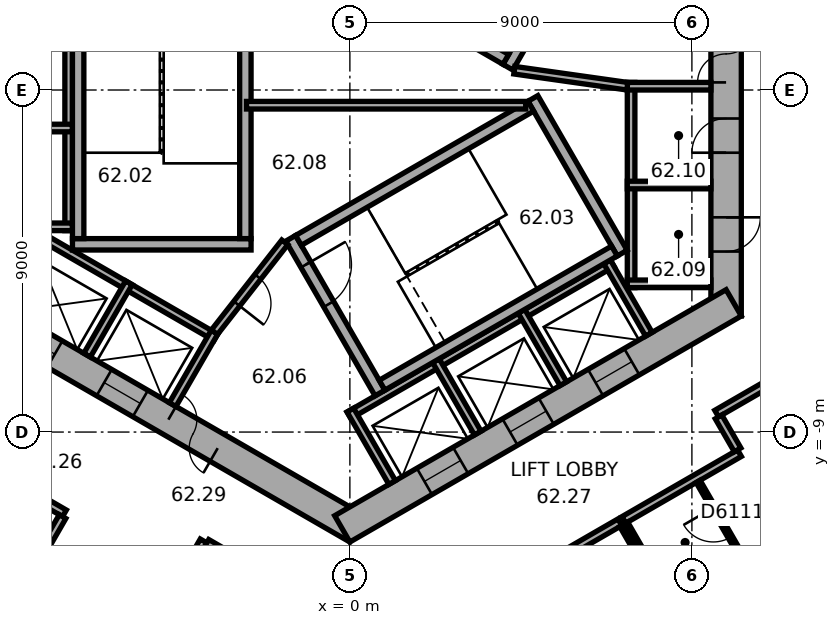
"""IFC4 building model, lengths in metres.
Left out: names, types, materials, properties, quantities, classifications, styles, units other than length and angle.
Written with IfcOpenShell. Run it as: python <this file> out.ifc"""

import sys

from ifc_helpers import new_model, si_unit, direction, frame, frame_2d, origin, place, context, subcontext, project, spatial, rectangle, extrude, element, fill, save


model = new_model("IFC4")
c1 = context("Model", 3, precision=1e-05, world=origin(), true_north=direction((0.0, 1.0)))
c2 = subcontext(c1, "Body", "Model", "MODEL_VIEW")
j1 = project(units=[si_unit("LENGTHUNIT", "METRE"), si_unit("PLANEANGLEUNIT", "RADIAN")], contexts=[c1])
p1 = place(None, origin())
s1 = spatial("IfcSite", under=j1, at=p1, CompositionType="ELEMENT")
p2 = place(p1, origin())
s2 = spatial("IfcBuilding", under=s1, at=p2, CompositionType="ELEMENT")
p3 = place(p2, frame((0.0, 0.0, 251.3)))
s3 = spatial("IfcBuildingStorey", under=s2, at=p3, CompositionType="ELEMENT", Elevation=251.3)
p4 = place(p3, frame((9.9, -5.947, 0.0), z_axis=(0.0, 0.0, 1.0), x_axis=(0.0, 1.0, 0.0)))
e1 = element("IfcWall", 1, at=p4, inside=s3, PredefinedType="SHEAR", context=c2, shape_type="SweptSolid", body=[
    extrude(rectangle(XDim=11.894, YDim=0.8, at=frame_2d((5.947, 0.0))), origin(), (0.0, 0.0, 1.0), 3.7),
])
p5 = place(p4, frame((6.147, 0.0, 0.0)))
e2 = element("IfcOpeningElement", 2, at=p5, cuts=e1, PredefinedType="OPENING", context=c2, shape_type="SweptSolid", body=[
    extrude(rectangle(XDim=1.5, YDim=2.1, at=frame_2d((0.75, 1.05))), frame((0.0, 0.41, 0.0), z_axis=(0.0, -1.0, 0.0), x_axis=(1.0, 0.0, 0.0)), (0.0, 0.0, 1.0), 0.82),
])
p6 = place(p4, frame((1.697, 0.0, 0.0)))
e3 = element("IfcOpeningElement", 3, at=p6, cuts=e1, PredefinedType="OPENING", context=c2, shape_type="SweptSolid", body=[
    extrude(rectangle(XDim=0.9, YDim=2.1, at=frame_2d((0.45, 1.05))), frame((0.0, 0.41, 0.0), z_axis=(0.0, -1.0, 0.0), x_axis=(1.0, 0.0, 0.0)), (0.0, 0.0, 1.0), 0.82),
])
p7 = place(p4, frame((4.297, 0.0, 0.0)))
e4 = element("IfcOpeningElement", 4, at=p7, cuts=e1, PredefinedType="OPENING", context=c2, shape_type="SweptSolid", body=[
    extrude(rectangle(XDim=0.9, YDim=2.1, at=frame_2d((0.45, 1.05))), frame((0.0, 0.41, 0.0), z_axis=(0.0, -1.0, 0.0), x_axis=(1.0, 0.0, 0.0)), (0.0, 0.0, 1.0), 0.82),
])
p8 = place(p3, frame((-10.1, -5.6, 0.0), z_axis=(0.0, 0.0, 1.0), x_axis=(0.866023897231, -0.500002609418, 0.0)))
e5 = element("IfcWall", 5, at=p8, inside=s3, PredefinedType="SHEAR", context=c2, shape_type="SweptSolid", body=[
    extrude(rectangle(XDim=11.894, YDim=0.8, at=frame_2d((5.947, 0.0))), origin(), (0.0, 0.0, 1.0), 3.7),
])
p9 = place(p8, frame((6.147, 0.0, 0.0)))
e6 = element("IfcOpeningElement", 6, at=p9, cuts=e5, PredefinedType="OPENING", context=c2, shape_type="SweptSolid", body=[
    extrude(rectangle(XDim=1.5, YDim=2.1, at=frame_2d((0.75, 1.05))), frame((0.0, 0.41, 0.0), z_axis=(0.0, -1.0, 0.0), x_axis=(1.0, 0.0, 0.0)), (0.0, 0.0, 1.0), 0.82),
])
p10 = place(p8, frame((1.597, 0.0, 0.0)))
e7 = element("IfcOpeningElement", 7, at=p10, cuts=e5, PredefinedType="OPENING", context=c2, shape_type="SweptSolid", body=[
    extrude(rectangle(XDim=1.1, YDim=2.1, at=frame_2d((0.55, 1.05))), frame((0.0, 0.41, 0.0), z_axis=(0.0, -1.0, 0.0), x_axis=(1.0, 0.0, 0.0)), (0.0, 0.0, 1.0), 0.82),
])
p11 = place(p8, frame((4.197, 0.0, 0.0)))
e8 = element("IfcOpeningElement", 8, at=p11, cuts=e5, PredefinedType="OPENING", context=c2, shape_type="SweptSolid", body=[
    extrude(rectangle(XDim=1.1, YDim=2.1, at=frame_2d((0.55, 1.05))), frame((0.0, 0.41, 0.0), z_axis=(0.0, -1.0, 0.0), x_axis=(1.0, 0.0, 0.0)), (0.0, 0.0, 1.0), 0.82),
])
p12 = place(p3, frame((-0.2, -11.547, 0.0), z_axis=(0.0, 0.0, 1.0), x_axis=(0.866023897231, 0.500002609418, 0.0)))
e9 = element("IfcWall", 9, at=p12, inside=s3, PredefinedType="SHEAR", context=c2, shape_type="SweptSolid", body=[
    extrude(rectangle(XDim=11.894, YDim=0.8, at=frame_2d((5.947, 0.0))), origin(), (0.0, 0.0, 1.0), 3.7),
])
p13 = place(p12, frame((2.497, 0.0, 0.0)))
e10 = element("IfcOpeningElement", 10, at=p13, cuts=e9, PredefinedType="OPENING", context=c2, shape_type="SweptSolid", body=[
    extrude(rectangle(XDim=1.1, YDim=2.1, at=frame_2d((0.55, 1.05))), frame((0.0, 0.41, 0.0), z_axis=(0.0, -1.0, 0.0), x_axis=(1.0, 0.0, 0.0)), (0.0, 0.0, 1.0), 0.82),
])
p14 = place(p12, frame((5.097, 0.0, 0.0)))
e11 = element("IfcOpeningElement", 11, at=p14, cuts=e9, PredefinedType="OPENING", context=c2, shape_type="SweptSolid", body=[
    extrude(rectangle(XDim=1.1, YDim=2.1, at=frame_2d((0.55, 1.05))), frame((0.0, 0.41, 0.0), z_axis=(0.0, -1.0, 0.0), x_axis=(1.0, 0.0, 0.0)), (0.0, 0.0, 1.0), 0.82),
])
p15 = place(p12, frame((7.697, 0.0, 0.0)))
e12 = element("IfcOpeningElement", 12, at=p15, cuts=e9, PredefinedType="OPENING", context=c2, shape_type="SweptSolid", body=[
    extrude(rectangle(XDim=1.1, YDim=2.1, at=frame_2d((0.55, 1.05))), frame((0.0, 0.41, 0.0), z_axis=(0.0, -1.0, 0.0), x_axis=(1.0, 0.0, 0.0)), (0.0, 0.0, 1.0), 0.82),
])
p16 = place(p3, frame((7.4, -5.2, 0.0), z_axis=(0.0, 0.0, 1.0), x_axis=(0.0, 1.0, 0.0)))
e13 = element("IfcWall", 13, at=p16, inside=s3, PredefinedType="PARTITIONING", context=c2, shape_type="SweptSolid", body=[
    extrude(rectangle(XDim=5.4, YDim=0.2, at=frame_2d((2.7, 0.0))), origin(), (0.0, 0.0, 1.0), 3.35),
])
for number, where, z_axis, x_axis in (
    (14, (7.3, -5.1, 0.0), (0.0, 0.0, 1.0), (1.0, 0.0, 0.0)),
    (15, (7.3, -2.5, 0.0), (0.0, 0.0, 1.0), (1.0, 0.0, 0.0)),
    (16, (7.3, 0.1, 0.0), (0.0, 0.0, 1.0), (1.0, 0.0, 0.0)),
):
    element("IfcWall", number, at=place(p3, frame(where, z_axis=z_axis, x_axis=x_axis)), inside=s3, PredefinedType="PARTITIONING", context=c2, shape_type="SweptSolid", body=[
        extrude(rectangle(XDim=2.2, YDim=0.2, at=frame_2d((1.1, 0.0))), origin(), (0.0, 0.0, 1.0), 3.35),
    ])
p17 = place(p3, frame((-7.4, 4.3, 0.0), z_axis=(0.0, 0.0, 1.0), x_axis=(0.0, -1.0, 0.0)))
e17 = element("IfcWall", 17, at=p17, inside=s3, PredefinedType="PARTITIONING", context=c2, shape_type="SweptSolid", body=[
    extrude(rectangle(XDim=8.0, YDim=0.2, at=frame_2d((4.0, 0.0))), origin(), (0.0, 0.0, 1.0), 3.35),
])
for number, where, z_axis, x_axis in (
    (18, (-7.3, -1.0, 0.0), (0.0, 0.0, 1.0), (-1.0, 0.0, 0.0)),
    (19, (-7.3, -3.6, 0.0), (0.0, 0.0, 1.0), (-1.0, 0.0, 0.0)),
):
    element("IfcWall", number, at=place(p3, frame(where, z_axis=z_axis, x_axis=x_axis)), inside=s3, PredefinedType="PARTITIONING", context=c2, shape_type="SweptSolid", body=[
        extrude(rectangle(XDim=2.2, YDim=0.2, at=frame_2d((1.1, 0.0))), origin(), (0.0, 0.0, 1.0), 3.35),
    ])
p18 = place(p3, frame((-8.203, -3.809, 0.0), z_axis=(0.0, 0.0, 1.0), x_axis=(0.866028230842, -0.499995103361, 0.0)))
e20 = element("IfcWall", 20, at=p18, inside=s3, PredefinedType="PARTITIONING", context=c2, shape_type="SweptSolid", body=[
    extrude(rectangle(XDim=5.4, YDim=0.2, at=frame_2d((2.7, 0.0))), origin(), (0.0, 0.0, 1.0), 3.35),
])
p19 = place(p3, frame((-5.815, -5.072, 0.0), z_axis=(0.0, 0.0, 1.0), x_axis=(-0.499946605688, -0.86605622881, 0.0)))
e21 = element("IfcWall", 21, at=p19, inside=s3, PredefinedType="PARTITIONING", context=c2, shape_type="SweptSolid", body=[
    extrude(rectangle(XDim=2.2, YDim=0.2, at=frame_2d((1.1, 0.0))), origin(), (0.0, 0.0, 1.0), 3.35),
])
p20 = place(p3, frame((-3.563, -6.372, 0.0), z_axis=(0.0, 0.0, 1.0), x_axis=(-0.499994660107, -0.866028486751, 0.0)))
e22 = element("IfcWall", 22, at=p20, inside=s3, PredefinedType="PARTITIONING", context=c2, shape_type="SweptSolid", body=[
    extrude(rectangle(XDim=2.2, YDim=0.2, at=frame_2d((1.1, 0.0))), origin(), (0.0, 0.0, 1.0), 3.35),
])
p21 = place(p3, frame((-0.024, -8.559, 0.0), z_axis=(0.0, 0.0, 1.0), x_axis=(0.866026010844, 0.49999894854, 0.0)))
e23 = element("IfcWall", 23, at=p21, inside=s3, PredefinedType="PARTITIONING", context=c2, shape_type="SweptSolid", body=[
    extrude(rectangle(XDim=8.0, YDim=0.2, at=frame_2d((4.0, 0.0))), origin(), (0.0, 0.0, 1.0), 3.35),
])
for number, where, z_axis, x_axis in (
    (24, (0.013, -8.422, 0.0), (0.0, 0.0, 1.0), (0.5, -0.866, 0.0)),
    (25, (2.264, -7.122, 0.0), (0.0, 0.0, 1.0), (0.5, -0.866, 0.0)),
    (26, (4.516, -5.822, 0.0), (0.0, 0.0, 1.0), (0.5, -0.866, 0.0)),
    (27, (6.768, -4.522, 0.0), (0.0, 0.0, 1.0), (0.5, -0.866, 0.0)),
):
    element("IfcWall", number, at=place(p3, frame(where, z_axis=z_axis, x_axis=x_axis)), inside=s3, PredefinedType="PARTITIONING", context=c2, shape_type="SweptSolid", body=[
        extrude(rectangle(XDim=2.2, YDim=0.2, at=frame_2d((1.1, 0.0))), origin(), (0.0, 0.0, 1.0), 3.35),
    ])
p22 = place(p3, frame((4.158, 0.602, 0.0), z_axis=(0.0, 0.0, 1.0), x_axis=(0.499977259774, 0.866038532462, 0.0)))
e28 = element("IfcWall", 28, at=p22, inside=s3, PredefinedType="SHEAR", context=c2, shape_type="SweptSolid", body=[
    extrude(rectangle(XDim=4.7, YDim=0.3, at=frame_2d((2.35, 0.0))), origin(), (0.0, 0.0, 1.0), 3.35),
])
p23 = place(p22, frame((0.8, 0.0, 0.0)))
e29 = element("IfcOpeningElement", 29, at=p23, cuts=e28, PredefinedType="OPENING", context=c2, shape_type="SweptSolid", body=[
    extrude(rectangle(XDim=1.2, YDim=2.1, at=frame_2d((0.6, 1.05))), frame((0.0, 0.16, 0.0), z_axis=(0.0, -1.0, 0.0), x_axis=(1.0, 0.0, 0.0)), (0.0, 0.0, 1.0), 0.32),
])
p24 = place(p3, frame((4.103, 0.807, 0.0), z_axis=(0.0, 0.0, 1.0), x_axis=(-0.866027801685, 0.499995846692, 0.0)))
e30 = element("IfcWall", 30, at=p24, inside=s3, PredefinedType="SHEAR", context=c2, shape_type="SweptSolid", body=[
    extrude(rectangle(XDim=7.06, YDim=0.3, at=frame_2d((3.53, 0.0))), origin(), (0.0, 0.0, 1.0), 3.35),
])
p25 = place(p3, frame((-2.6, -4.06, 0.0), z_axis=(0.0, 0.0, 1.0), x_axis=(-1.0, 0.0, 0.0)))
e31 = element("IfcWall", 31, at=p25, inside=s3, PredefinedType="SHEAR", context=c2, shape_type="SweptSolid", body=[
    extrude(rectangle(XDim=4.7, YDim=0.3, at=frame_2d((2.35, 0.0))), origin(), (0.0, 0.0, 1.0), 3.35),
])
for number, where, z_axis, x_axis in (
    (32, (-2.75, 3.15, 0.0), (0.0, 0.0, 1.0), (0.0, -1.0, 0.0)),
    (33, (-7.15, 3.15, 0.0), (0.0, 0.0, 1.0), (0.0, -1.0, 0.0)),
):
    element("IfcWall", number, at=place(p3, frame(where, z_axis=z_axis, x_axis=x_axis)), inside=s3, PredefinedType="SHEAR", context=c2, shape_type="SweptSolid", body=[
        extrude(rectangle(XDim=7.06, YDim=0.3, at=frame_2d((3.53, 0.0))), origin(), (0.0, 0.0, 1.0), 3.35),
    ])
p26 = place(p3, frame((-1.558, -3.902, 0.0), z_axis=(0.0, 0.0, 1.0), x_axis=(0.499977259774, -0.866038532462, 0.0)))
e34 = element("IfcWall", 34, at=p26, inside=s3, PredefinedType="SHEAR", context=c2, shape_type="SweptSolid", body=[
    extrude(rectangle(XDim=4.7, YDim=0.3, at=frame_2d((2.35, 0.0))), origin(), (0.0, 0.0, 1.0), 3.35),
])
p27 = place(p26, frame((0.8, 0.0, 0.0)))
e35 = element("IfcOpeningElement", 35, at=p27, cuts=e34, PredefinedType="OPENING", context=c2, shape_type="SweptSolid", body=[
    extrude(rectangle(XDim=1.2, YDim=2.1, at=frame_2d((0.6, 1.05))), frame((0.0, 0.16, 0.0), z_axis=(0.0, -1.0, 0.0), x_axis=(1.0, 0.0, 0.0)), (0.0, 0.0, 1.0), 0.32),
])
p28 = place(p3, frame((4.816, -0.222, 0.0), z_axis=(0.0, 0.0, 1.0), x_axis=(0.499977259774, -0.866038532462, 0.0)))
e36 = element("IfcWall", 36, at=p28, inside=s3, PredefinedType="SHEAR", context=c2, shape_type="SweptSolid", body=[
    extrude(rectangle(XDim=4.7, YDim=0.3, at=frame_2d((2.35, 0.0))), origin(), (0.0, 0.0, 1.0), 3.35),
])
for number, where, z_axis, x_axis in (
    (37, (-1.353, -3.957, 0.0), (0.0, 0.0, 1.0), (0.866, 0.5, 0.0)),
    (38, (0.847, -7.767, 0.0), (0.0, 0.0, 1.0), (0.866, 0.5, 0.0)),
):
    element("IfcWall", number, at=place(p3, frame(where, z_axis=z_axis, x_axis=x_axis)), inside=s3, PredefinedType="SHEAR", context=c2, shape_type="SweptSolid", body=[
        extrude(rectangle(XDim=7.06, YDim=0.3, at=frame_2d((3.53, 0.0))), origin(), (0.0, 0.0, 1.0), 3.35),
    ])
p29 = place(p3, frame((4.327, 0.521, 0.0), z_axis=(0.0, 0.0, 1.0), x_axis=(0.990124376366, -0.14019172346, 0.0)))
e39 = element("IfcWall", 39, at=p29, inside=s3, PredefinedType="PARTITIONING", context=c2, shape_type="SweptSolid", body=[
    extrude(rectangle(XDim=3.002, YDim=0.2, at=frame_2d((1.501, 0.0))), origin(), (0.0, 0.0, 1.0), 3.35),
])
p30 = place(p3, frame((-1.712, -4.008, 0.0), z_axis=(0.0, 0.0, 1.0), x_axis=(-0.616549420702, -0.787316208287, 0.0)))
e40 = element("IfcWall", 40, at=p30, inside=s3, PredefinedType="PARTITIONING", context=c2, shape_type="SweptSolid", body=[
    extrude(rectangle(XDim=3.002, YDim=0.2, at=frame_2d((1.501, 0.0))), origin(), (0.0, 0.0, 1.0), 3.35),
])
p31 = place(p30, frame((1.15, 0.0, 0.0)))
e41 = element("IfcOpeningElement", 41, at=p31, cuts=e40, PredefinedType="OPENING", context=c2, shape_type="SweptSolid", body=[
    extrude(rectangle(XDim=0.9, YDim=2.1, at=frame_2d((0.45, 1.05))), frame((0.0, 0.11, 0.0), z_axis=(0.0, -1.0, 0.0), x_axis=(1.0, 0.0, 0.0)), (0.0, 0.0, 1.0), 0.22),
])
p32 = place(p3, frame((-2.72, -0.4, 0.0), z_axis=(0.0, 0.0, 1.0), x_axis=(1.0, 0.0, 0.0)))
e42 = element("IfcWall", 42, at=p32, inside=s3, PredefinedType="PARTITIONING", context=c2, shape_type="SweptSolid", body=[
    extrude(rectangle(XDim=7.347, YDim=0.2, at=frame_2d((3.674, 0.0))), origin(), (0.0, 0.0, 1.0), 3.35),
])
p33 = place(p3, frame((-11.551, -8.805, 0.0), z_axis=(0.0, 0.0, 1.0), x_axis=(0.866038310922, -0.499977643516, 0.0)))
e43 = element("IfcWall", 43, at=p33, inside=s3, PredefinedType="PARTITIONING", context=c2, shape_type="SweptSolid", body=[
    extrude(rectangle(XDim=4.665, YDim=0.2, at=frame_2d((2.333, 0.0))), origin(), (0.0, 0.0, 1.0), 3.35),
])
p34 = place(p3, frame((-10.585, -16.463, 0.0), z_axis=(0.0, 0.0, 1.0), x_axis=(0.499993802756, 0.866028981735, 0.0)))
e44 = element("IfcWall", 44, at=p34, inside=s3, PredefinedType="PARTITIONING", context=c2, shape_type="SweptSolid", body=[
    extrude(rectangle(XDim=6.049, YDim=0.2, at=frame_2d((3.024, 0.0))), origin(), (0.0, 0.0, 1.0), 2.65),
])
p35 = place(p34, frame((2.524, 0.0, 0.0)))
e45 = element("IfcOpeningElement", 45, at=p35, cuts=e44, PredefinedType="OPENING", context=c2, shape_type="SweptSolid", body=[
    extrude(rectangle(XDim=1.0, YDim=2.1, at=frame_2d((0.5, 1.05))), frame((0.0, 0.11, 0.0), z_axis=(0.0, -1.0, 0.0), x_axis=(1.0, 0.0, 0.0)), (0.0, 0.0, 1.0), 0.22),
])
p36 = place(p3, frame((-7.525, -18.23, 0.0), z_axis=(0.0, 0.0, 1.0), x_axis=(0.499983153418, 0.866035129944, 0.0)))
e46 = element("IfcWall", 46, at=p36, inside=s3, PredefinedType="PARTITIONING", context=c2, shape_type="SweptSolid", body=[
    extrude(rectangle(XDim=7.35, YDim=0.2, at=frame_2d((3.675, 0.0))), origin(), (0.0, 0.0, 1.0), 3.35),
])
p37 = place(p36, frame((3.175, 0.0, 0.0)))
e47 = element("IfcOpeningElement", 47, at=p37, cuts=e46, PredefinedType="OPENING", context=c2, shape_type="SweptSolid", body=[
    extrude(rectangle(XDim=1.0, YDim=2.1, at=frame_2d((0.5, 1.05))), frame((0.0, 0.11, 0.0), z_axis=(0.0, -1.0, 0.0), x_axis=(1.0, 0.0, 0.0)), (0.0, 0.0, 1.0), 0.22),
])
p38 = place(p3, frame((-3.763, -11.915, 0.0), z_axis=(0.0, 0.0, 1.0), x_axis=(0.866037915695, -0.499978328108, 0.0)))
e48 = element("IfcWall", 48, at=p38, inside=s3, PredefinedType="PARTITIONING", context=c2, shape_type="SweptSolid", body=[
    extrude(rectangle(XDim=3.249, YDim=0.2, at=frame_2d((1.625, 0.0))), origin(), (0.0, 0.0, 1.0), 3.35),
])
p39 = place(p3, frame((5.373, -12.372, 0.0), z_axis=(0.0, 0.0, 1.0), x_axis=(0.866010750942, 0.50002537861, 0.0)))
e49 = element("IfcWall", 49, at=p39, inside=s3, PredefinedType="PARTITIONING", context=c2, shape_type="SweptSolid", body=[
    extrude(rectangle(XDim=2.0, YDim=0.2, at=frame_2d((1.0, 0.0))), origin(), (0.0, 0.0, 1.0), 3.35),
])
p40 = place(p3, frame((7.155, -11.459, 0.0), z_axis=(0.0, 0.0, 1.0), x_axis=(0.500077740698, -0.865980515519, 0.0)))
e50 = element("IfcWall", 50, at=p40, inside=s3, PredefinedType="PARTITIONING", context=c2, shape_type="SweptSolid", body=[
    extrude(rectangle(XDim=2.3, YDim=0.12, at=frame_2d((1.15, 0.0))), origin(), (0.0, 0.0, 1.0), 3.35),
])
p41 = place(p3, frame((7.208, -11.312, 0.0), z_axis=(0.0, 0.0, 1.0), x_axis=(0.866050243185, 0.499956974429, 0.0)))
e51 = element("IfcWall", 51, at=p41, inside=s3, PredefinedType="PARTITIONING", context=c2, shape_type="SweptSolid", body=[
    extrude(rectangle(XDim=3.514, YDim=0.2, at=frame_2d((1.757, 0.0))), origin(), (0.0, 0.0, 1.0), 3.35),
])
p42 = place(p3, frame((8.509, -13.564, 0.0), z_axis=(0.0, 0.0, 1.0), x_axis=(-0.500004234368, 0.866022959057, 0.0)))
e52 = element("IfcWall", 52, at=p42, inside=s3, PredefinedType="PARTITIONING", context=c2, shape_type="SweptSolid", body=[
    extrude(rectangle(XDim=2.5, YDim=0.12, at=frame_2d((1.25, 0.0))), origin(), (0.0, 0.0, 1.0), 3.35),
])
p43 = place(p3, frame((9.164, -10.299, 0.0), z_axis=(0.0, 0.0, 1.0), x_axis=(0.500004234368, -0.866022959057, 0.0)))
e53 = element("IfcWall", 53, at=p43, inside=s3, PredefinedType="PARTITIONING", context=c2, shape_type="SweptSolid", body=[
    extrude(rectangle(XDim=2.5, YDim=0.12, at=frame_2d((1.25, 0.0))), origin(), (0.0, 0.0, 1.0), 3.35),
])
p44 = place(p43, frame((0.8, 0.0, 0.0)))
e54 = element("IfcOpeningElement", 54, at=p44, cuts=e53, PredefinedType="OPENING", context=c2, shape_type="SweptSolid", body=[
    extrude(rectangle(XDim=0.9, YDim=2.1, at=frame_2d((0.45, 1.05))), frame((0.0, 0.07, 0.0), z_axis=(0.0, -1.0, 0.0), x_axis=(1.0, 0.0, 0.0)), (0.0, 0.0, 1.0), 0.14),
])
p45 = place(p3, frame((9.652, -8.515, 0.0), z_axis=(0.0, 0.0, 1.0), x_axis=(0.866020375458, 0.500008709215, 0.0)))
e55 = element("IfcWall", 55, at=p45, inside=s3, PredefinedType="PARTITIONING", context=c2, shape_type="SweptSolid", body=[
    extrude(rectangle(XDim=1.846, YDim=0.2, at=frame_2d((0.923, 0.0))), origin(), (0.0, 0.0, 1.0), 3.35),
])
p46 = place(p3, frame((10.202, -9.469, 0.0), z_axis=(0.0, 0.0, 1.0), x_axis=(-0.499968756647, 0.866043441391, 0.0)))
e56 = element("IfcWall", 56, at=p46, inside=s3, PredefinedType="PARTITIONING", context=c2, shape_type="SweptSolid", body=[
    extrude(rectangle(XDim=1.001, YDim=0.2, at=frame_2d((0.5, 0.0))), origin(), (0.0, 0.0, 1.0), 3.35),
])
p47 = place(p5, origin())
e57 = element("IfcDoor", 57, at=p47, inside=s3, OperationType="DOUBLE_DOOR_SINGLE_SWING", PredefinedType="DOOR", context=c2, shape_type="SweptSolid", body=[
    extrude(rectangle(XDim=1.5, YDim=2.1, at=frame_2d((0.75, 1.05))), frame((0.0, 0.025, 0.0), z_axis=(0.0, -1.0, 0.0), x_axis=(1.0, 0.0, 0.0)), (0.0, 0.0, 1.0), 0.05),
])
fill(e2, e57)
p48 = place(p9, origin())
e58 = element("IfcDoor", 58, at=p48, inside=s3, OperationType="DOUBLE_DOOR_SINGLE_SWING", PredefinedType="DOOR", context=c2, shape_type="SweptSolid", body=[
    extrude(rectangle(XDim=1.5, YDim=2.1, at=frame_2d((0.75, 1.05))), frame((0.0, 0.025, 0.0), z_axis=(0.0, -1.0, 0.0), x_axis=(1.0, 0.0, 0.0)), (0.0, 0.0, 1.0), 0.05),
])
fill(e6, e58)
p49 = place(p27, origin())
e59 = element("IfcDoor", 59, at=p49, inside=s3, OperationType="SINGLE_SWING_RIGHT", PredefinedType="DOOR", context=c2, shape_type="SweptSolid", body=[
    extrude(rectangle(XDim=1.2, YDim=2.1, at=frame_2d((0.6, 1.05))), frame((0.0, 0.025, 0.0), z_axis=(0.0, -1.0, 0.0), x_axis=(1.0, 0.0, 0.0)), (0.0, 0.0, 1.0), 0.05),
])
fill(e35, e59)
p50 = place(p31, origin())
e60 = element("IfcDoor", 60, at=p50, inside=s3, OperationType="SINGLE_SWING_LEFT", PredefinedType="DOOR", context=c2, shape_type="SweptSolid", body=[
    extrude(rectangle(XDim=0.9, YDim=2.1, at=frame_2d((0.45, 1.05))), frame((0.0, 0.025, 0.0), z_axis=(0.0, -1.0, 0.0), x_axis=(1.0, 0.0, 0.0)), (0.0, 0.0, 1.0), 0.05),
])
fill(e41, e60)
p51 = place(p6, origin())
e61 = element("IfcDoor", 61, at=p51, inside=s3, OperationType="SINGLE_SWING_LEFT", PredefinedType="DOOR", context=c2, shape_type="SweptSolid", body=[
    extrude(rectangle(XDim=0.9, YDim=2.1, at=frame_2d((0.45, 1.05))), frame((0.0, 0.025, 0.0), z_axis=(0.0, -1.0, 0.0), x_axis=(1.0, 0.0, 0.0)), (0.0, 0.0, 1.0), 0.05),
])
fill(e3, e61)
p52 = place(p7, origin())
e62 = element("IfcDoor", 62, at=p52, inside=s3, OperationType="SINGLE_SWING_LEFT", PredefinedType="DOOR", context=c2, shape_type="SweptSolid", body=[
    extrude(rectangle(XDim=0.9, YDim=2.1, at=frame_2d((0.45, 1.05))), frame((0.0, 0.025, 0.0), z_axis=(0.0, -1.0, 0.0), x_axis=(1.0, 0.0, 0.0)), (0.0, 0.0, 1.0), 0.05),
])
fill(e4, e62)
p53 = place(p10, origin())
e63 = element("IfcDoor", 63, at=p53, inside=s3, OperationType="DOUBLE_DOOR_SLIDING", PredefinedType="DOOR", context=c2, shape_type="SweptSolid", body=[
    extrude(rectangle(XDim=1.1, YDim=2.1, at=frame_2d((0.55, 1.05))), frame((0.0, 0.025, 0.0), z_axis=(0.0, -1.0, 0.0), x_axis=(1.0, 0.0, 0.0)), (0.0, 0.0, 1.0), 0.05),
])
fill(e7, e63)
p54 = place(p11, origin())
e64 = element("IfcDoor", 64, at=p54, inside=s3, OperationType="DOUBLE_DOOR_SLIDING", PredefinedType="DOOR", context=c2, shape_type="SweptSolid", body=[
    extrude(rectangle(XDim=1.1, YDim=2.1, at=frame_2d((0.55, 1.05))), frame((0.0, 0.025, 0.0), z_axis=(0.0, -1.0, 0.0), x_axis=(1.0, 0.0, 0.0)), (0.0, 0.0, 1.0), 0.05),
])
fill(e8, e64)
p55 = place(p13, origin())
e65 = element("IfcDoor", 65, at=p55, inside=s3, OperationType="DOUBLE_DOOR_SLIDING", PredefinedType="DOOR", context=c2, shape_type="SweptSolid", body=[
    extrude(rectangle(XDim=1.1, YDim=2.1, at=frame_2d((0.55, 1.05))), frame((0.0, 0.025, 0.0), z_axis=(0.0, -1.0, 0.0), x_axis=(1.0, 0.0, 0.0)), (0.0, 0.0, 1.0), 0.05),
])
fill(e10, e65)
p56 = place(p14, origin())
e66 = element("IfcDoor", 66, at=p56, inside=s3, OperationType="DOUBLE_DOOR_SLIDING", PredefinedType="DOOR", context=c2, shape_type="SweptSolid", body=[
    extrude(rectangle(XDim=1.1, YDim=2.1, at=frame_2d((0.55, 1.05))), frame((0.0, 0.025, 0.0), z_axis=(0.0, -1.0, 0.0), x_axis=(1.0, 0.0, 0.0)), (0.0, 0.0, 1.0), 0.05),
])
fill(e11, e66)
p57 = place(p15, origin())
e67 = element("IfcDoor", 67, at=p57, inside=s3, OperationType="DOUBLE_DOOR_SLIDING", PredefinedType="DOOR", context=c2, shape_type="SweptSolid", body=[
    extrude(rectangle(XDim=1.1, YDim=2.1, at=frame_2d((0.55, 1.05))), frame((0.0, 0.025, 0.0), z_axis=(0.0, -1.0, 0.0), x_axis=(1.0, 0.0, 0.0)), (0.0, 0.0, 1.0), 0.05),
])
fill(e12, e67)
p58 = place(p44, origin())
e68 = element("IfcDoor", 68, at=p58, inside=s3, OperationType="SINGLE_SWING_LEFT", PredefinedType="DOOR", context=c2, shape_type="SweptSolid", body=[
    extrude(rectangle(XDim=0.9, YDim=2.1, at=frame_2d((0.45, 1.05))), frame((0.0, 0.025, 0.0), z_axis=(0.0, -1.0, 0.0), x_axis=(1.0, 0.0, 0.0)), (0.0, 0.0, 1.0), 0.05),
])
fill(e54, e68)
save(model, sys.argv[1])
